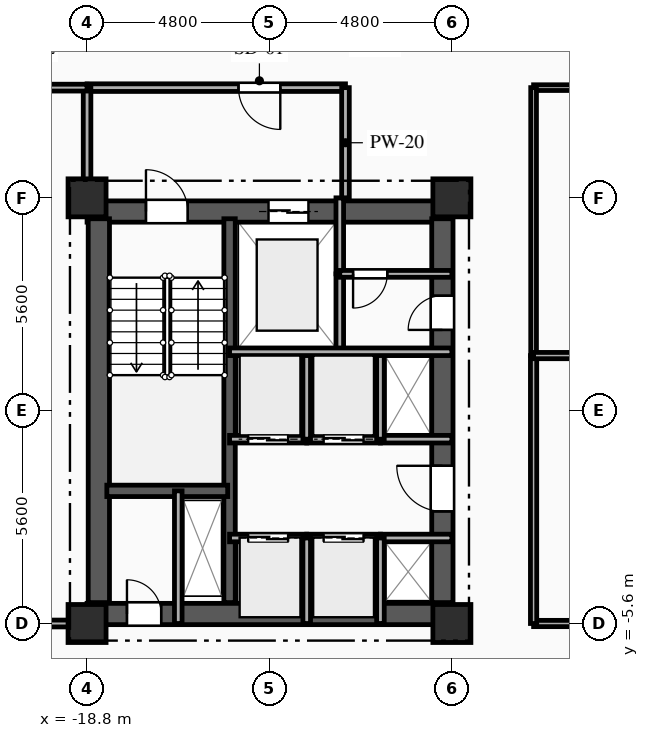
"""IFC4 building model, lengths in metres.
Left out: names, types, materials, properties, quantities, classifications, styles, units other than length and angle.
Written with IfcOpenShell. Run it as: python <this file> out.ifc"""

import sys

from ifc_helpers import new_model, si_unit, direction, frame, frame_2d, origin, origin_2d, place, context, subcontext, project, spatial, rectangle, extrude, element, fill, save


model = new_model("IFC4")
c1 = context("Model", 3, precision=1e-05, world=origin(), true_north=direction((0.0, 1.0)))
c2 = subcontext(c1, "Body", "Model", "MODEL_VIEW")
j1 = project(units=[si_unit("LENGTHUNIT", "METRE"), si_unit("PLANEANGLEUNIT", "RADIAN")], contexts=[c1])
p1 = place(None, origin())
s1 = spatial("IfcSite", under=j1, at=p1, CompositionType="ELEMENT")
p2 = place(p1, origin())
s2 = spatial("IfcBuilding", under=s1, at=p2, CompositionType="ELEMENT")
p3 = place(p2, frame((0.0, 0.0, 102.45)))
s3 = spatial("IfcBuildingStorey", under=s2, at=p3, CompositionType="ELEMENT", Elevation=102.45)
for number, where, z_axis, x_axis in (
    (1, (-18.8, -5.6, 0.0), (0.0, 0.0, 1.0), (1.0, 0.0, 0.0)),
    (2, (-18.8, 5.6, 0.0), (0.0, 0.0, 1.0), (1.0, 0.0, 0.0)),
    (3, (-9.2, -5.6, 0.0), (0.0, 0.0, 1.0), (1.0, 0.0, 0.0)),
    (4, (-9.2, 5.6, 0.0), (0.0, 0.0, 1.0), (1.0, 0.0, 0.0)),
):
    element("IfcColumn", number, at=place(p3, frame(where, z_axis=z_axis, x_axis=x_axis)), inside=s3, PredefinedType="COLUMN", context=c2, shape_type="SweptSolid", body=[
        extrude(rectangle(XDim=1.0, YDim=1.0, at=origin_2d()), origin(), (0.0, 0.0, 1.0), 3.35),
    ])
p4 = place(p3, frame((-18.8, 5.24, 0.0), z_axis=(0.0, 0.0, 1.0), x_axis=(1.0, 0.0, 0.0)))
e5 = element("IfcWall", 5, at=p4, inside=s3, PredefinedType="SHEAR", context=c2, shape_type="SweptSolid", body=[
    extrude(rectangle(XDim=9.6, YDim=0.56, at=frame_2d((4.8, 0.0))), origin(), (0.0, 0.0, 1.0), 3.045),
])
p5 = place(p4, frame((1.55, 0.0, 0.0)))
e6 = element("IfcOpeningElement", 6, at=p5, cuts=e5, PredefinedType="OPENING", context=c2, shape_type="SweptSolid", body=[
    extrude(rectangle(XDim=1.1, YDim=2.15, at=frame_2d((0.55, 1.075))), frame((0.0, 0.29, 0.0), z_axis=(0.0, -1.0, 0.0), x_axis=(1.0, 0.0, 0.0)), (0.0, 0.0, 1.0), 0.58),
])
p6 = place(p4, frame((4.775, 0.0, 0.0)))
e7 = element("IfcOpeningElement", 7, at=p6, cuts=e5, PredefinedType="OPENING", context=c2, shape_type="SweptSolid", body=[
    extrude(rectangle(XDim=1.05, YDim=2.1, at=frame_2d((0.525, 1.05))), frame((0.0, 0.29, 0.0), z_axis=(0.0, -1.0, 0.0), x_axis=(1.0, 0.0, 0.0)), (0.0, 0.0, 1.0), 0.58),
])
p7 = place(p3, frame((-18.8, -5.35, 0.0), z_axis=(0.0, 0.0, 1.0), x_axis=(1.0, 0.0, 0.0)))
e8 = element("IfcWall", 8, at=p7, inside=s3, PredefinedType="SHEAR", context=c2, shape_type="SweptSolid", body=[
    extrude(rectangle(XDim=9.6, YDim=0.56, at=frame_2d((4.8, 0.0))), origin(), (0.0, 0.0, 1.0), 3.045),
])
p8 = place(p7, frame((1.05, 0.0, 0.0)))
e9 = element("IfcOpeningElement", 9, at=p8, cuts=e8, PredefinedType="OPENING", context=c2, shape_type="SweptSolid", body=[
    extrude(rectangle(XDim=0.9, YDim=2.1, at=frame_2d((0.45, 1.05))), frame((0.0, 0.29, 0.0), z_axis=(0.0, -1.0, 0.0), x_axis=(1.0, 0.0, 0.0)), (0.0, 0.0, 1.0), 0.58),
])
p9 = place(p3, frame((-18.49, -5.05, 0.0), z_axis=(0.0, 0.0, 1.0), x_axis=(0.0, 1.0, 0.0)))
e10 = element("IfcWall", 10, at=p9, inside=s3, PredefinedType="SHEAR", context=c2, shape_type="SweptSolid", body=[
    extrude(rectangle(XDim=10.1, YDim=0.56, at=frame_2d((5.05, 0.0))), origin(), (0.0, 0.0, 1.0), 3.045),
])
p10 = place(p3, frame((-9.45, -5.05, 0.0), z_axis=(0.0, 0.0, 1.0), x_axis=(0.0, 1.0, 0.0)))
e11 = element("IfcWall", 11, at=p10, inside=s3, PredefinedType="SHEAR", context=c2, shape_type="SweptSolid", body=[
    extrude(rectangle(XDim=10.1, YDim=0.56, at=frame_2d((5.05, 0.0))), origin(), (0.0, 0.0, 1.0), 3.045),
])
p11 = place(p10, frame((7.175, 0.0, 0.0)))
e12 = element("IfcOpeningElement", 12, at=p11, cuts=e11, PredefinedType="OPENING", context=c2, shape_type="SweptSolid", body=[
    extrude(rectangle(XDim=0.9, YDim=2.1, at=frame_2d((0.45, 1.05))), frame((0.0, 0.29, 0.0), z_axis=(0.0, -1.0, 0.0), x_axis=(1.0, 0.0, 0.0)), (0.0, 0.0, 1.0), 0.58),
])
p12 = place(p10, frame((2.4, 0.0, 0.0)))
e13 = element("IfcOpeningElement", 13, at=p12, cuts=e11, PredefinedType="OPENING", context=c2, shape_type="SweptSolid", body=[
    extrude(rectangle(XDim=1.2, YDim=2.15, at=frame_2d((0.6, 1.075))), frame((0.0, 0.29, 0.0), z_axis=(0.0, -1.0, 0.0), x_axis=(1.0, 0.0, 0.0)), (0.0, 0.0, 1.0), 0.58),
])
p13 = place(p3, frame((-15.05, -5.05, 0.0), z_axis=(0.0, 0.0, 1.0), x_axis=(0.0, 1.0, 0.0)))
e14 = element("IfcWall", 14, at=p13, inside=s3, PredefinedType="SHEAR", context=c2, shape_type="SweptSolid", body=[
    extrude(rectangle(XDim=10.1, YDim=0.3, at=frame_2d((5.05, 0.0))), origin(), (0.0, 0.0, 1.0), 3.045),
])
p14 = place(p3, frame((-18.28, -2.11, 0.0), z_axis=(0.0, 0.0, 1.0), x_axis=(1.0, 0.0, 0.0)))
e15 = element("IfcWall", 15, at=p14, inside=s3, PredefinedType="SHEAR", context=c2, shape_type="SweptSolid", body=[
    extrude(rectangle(XDim=3.18, YDim=0.3, at=frame_2d((1.59, 0.0))), origin(), (0.0, 0.0, 1.0), 3.045),
])
p15 = place(p3, frame((-16.4, -5.6, 0.0), z_axis=(0.0, 0.0, 1.0), x_axis=(0.0, 1.0, 0.0)))
e16 = element("IfcWall", 16, at=p15, inside=s3, PredefinedType="PARTITIONING", context=c2, shape_type="SweptSolid", body=[
    extrude(rectangle(XDim=3.49, YDim=0.2, at=frame_2d((1.745, 0.0))), origin(), (0.0, 0.0, 1.0), 3.045),
])
p16 = place(p3, frame((-12.15, 1.55, 0.0), z_axis=(0.0, 0.0, 1.0), x_axis=(0.0, 1.0, 0.0)))
e17 = element("IfcWall", 17, at=p16, inside=s3, PredefinedType="PARTITIONING", context=c2, shape_type="SweptSolid", body=[
    extrude(rectangle(XDim=2.05, YDim=0.2, at=frame_2d((1.025, 0.0))), origin(), (0.0, 0.0, 1.0), 3.045),
])
p17 = place(p3, frame((-12.15, 3.6, 0.0), z_axis=(0.0, 0.0, 1.0), x_axis=(0.0, 1.0, 0.0)))
e18 = element("IfcWall", 18, at=p17, inside=s3, PredefinedType="PARTITIONING", context=c2, shape_type="SweptSolid", body=[
    extrude(rectangle(XDim=2.0, YDim=0.2, at=frame_2d((1.0, 0.0))), origin(), (0.0, 0.0, 1.0), 3.045),
])
p18 = place(p3, frame((-12.0, 8.5, 0.0), z_axis=(0.0, 0.0, 1.0), x_axis=(-1.0, 0.0, 0.0)))
e19 = element("IfcWall", 19, at=p18, inside=s3, PredefinedType="PARTITIONING", context=c2, shape_type="SweptSolid", body=[
    extrude(rectangle(XDim=6.8, YDim=0.2, at=frame_2d((3.4, 0.0))), origin(), (0.0, 0.0, 1.0), 3.045),
])
p19 = place(p18, frame((1.715, 0.0, 0.0)))
e20 = element("IfcOpeningElement", 20, at=p19, cuts=e19, PredefinedType="OPENING", context=c2, shape_type="SweptSolid", body=[
    extrude(rectangle(XDim=1.1, YDim=2.15, at=frame_2d((0.55, 1.075))), frame((0.0, 0.11, 0.0), z_axis=(0.0, -1.0, 0.0), x_axis=(1.0, 0.0, 0.0)), (0.0, 0.0, 1.0), 0.22),
])
p20 = place(p3, frame((-12.0, 5.6, 0.0), z_axis=(0.0, 0.0, 1.0), x_axis=(0.0, 1.0, 0.0)))
e21 = element("IfcWall", 21, at=p20, inside=s3, PredefinedType="PARTITIONING", context=c2, shape_type="SweptSolid", body=[
    extrude(rectangle(XDim=2.9, YDim=0.2, at=frame_2d((1.45, 0.0))), origin(), (0.0, 0.0, 1.0), 3.045),
])
p21 = place(p3, frame((-18.8, 8.5, 0.0), z_axis=(0.0, 0.0, 1.0), x_axis=(0.0, -1.0, 0.0)))
e22 = element("IfcWall", 22, at=p21, inside=s3, PredefinedType="PARTITIONING", context=c2, shape_type="SweptSolid", body=[
    extrude(rectangle(XDim=2.9, YDim=0.2, at=frame_2d((1.45, 0.0))), origin(), (0.0, 0.0, 1.0), 2.53),
])
p22 = place(p3, frame((-9.2, 3.6, 0.0), z_axis=(0.0, 0.0, 1.0), x_axis=(-1.0, 0.0, 0.0)))
e23 = element("IfcWall", 23, at=p22, inside=s3, PredefinedType="PARTITIONING", context=c2, shape_type="SweptSolid", body=[
    extrude(rectangle(XDim=2.95, YDim=0.18, at=frame_2d((1.475, 0.0))), origin(), (0.0, 0.0, 1.0), 3.045),
])
p23 = place(p22, frame((1.7, 0.0, 0.0)))
e24 = element("IfcOpeningElement", 24, at=p23, cuts=e23, PredefinedType="OPENING", context=c2, shape_type="SweptSolid", body=[
    extrude(rectangle(XDim=0.9, YDim=2.1, at=frame_2d((0.45, 1.05))), frame((0.0, 0.1, 0.0), z_axis=(0.0, -1.0, 0.0), x_axis=(1.0, 0.0, 0.0)), (0.0, 0.0, 1.0), 0.2),
])
p24 = place(p3, frame((-15.05, -3.35, 0.0), z_axis=(0.0, 0.0, 1.0), x_axis=(1.0, 0.0, 0.0)))
e25 = element("IfcWall", 25, at=p24, inside=s3, PredefinedType="PARTITIONING", context=c2, shape_type="SweptSolid", body=[
    extrude(rectangle(XDim=2.03, YDim=0.2, at=frame_2d((1.015, 0.0))), origin(), (0.0, 0.0, 1.0), 3.045),
])
p25 = place(p24, frame((0.49, 0.0, 0.0)))
e26 = element("IfcOpeningElement", 26, at=p25, cuts=e25, PredefinedType="OPENING", context=c2, shape_type="SweptSolid", body=[
    extrude(rectangle(XDim=1.05, YDim=2.1, at=frame_2d((0.525, 1.05))), frame((0.0, 0.11, 0.0), z_axis=(0.0, -1.0, 0.0), x_axis=(1.0, 0.0, 0.0)), (0.0, 0.0, 1.0), 0.22),
])
p26 = place(p3, frame((-13.02, -3.35, 0.0), z_axis=(0.0, 0.0, 1.0), x_axis=(1.0, 0.0, 0.0)))
e27 = element("IfcWall", 27, at=p26, inside=s3, PredefinedType="PARTITIONING", context=c2, shape_type="SweptSolid", body=[
    extrude(rectangle(XDim=1.94, YDim=0.2, at=frame_2d((0.97, 0.0))), origin(), (0.0, 0.0, 1.0), 3.045),
])
p27 = place(p26, frame((0.445, 0.0, 0.0)))
e28 = element("IfcOpeningElement", 28, at=p27, cuts=e27, PredefinedType="OPENING", context=c2, shape_type="SweptSolid", body=[
    extrude(rectangle(XDim=1.05, YDim=2.1, at=frame_2d((0.525, 1.05))), frame((0.0, 0.11, 0.0), z_axis=(0.0, -1.0, 0.0), x_axis=(1.0, 0.0, 0.0)), (0.0, 0.0, 1.0), 0.22),
])
p28 = place(p3, frame((-11.08, -3.35, 0.0), z_axis=(0.0, 0.0, 1.0), x_axis=(1.0, 0.0, 0.0)))
e29 = element("IfcWall", 29, at=p28, inside=s3, PredefinedType="PARTITIONING", context=c2, shape_type="SweptSolid", body=[
    extrude(rectangle(XDim=1.88, YDim=0.2, at=frame_2d((0.94, 0.0))), origin(), (0.0, 0.0, 1.0), 2.76),
])
p29 = place(p3, frame((-13.02, -0.75, 0.0), z_axis=(0.0, 0.0, 1.0), x_axis=(-1.0, 0.0, 0.0)))
e30 = element("IfcWall", 30, at=p29, inside=s3, PredefinedType="PARTITIONING", context=c2, shape_type="SweptSolid", body=[
    extrude(rectangle(XDim=2.03, YDim=0.2, at=frame_2d((1.015, 0.0))), origin(), (0.0, 0.0, 1.0), 3.045),
])
p30 = place(p29, frame((0.49, 0.0, 0.0)))
e31 = element("IfcOpeningElement", 31, at=p30, cuts=e30, PredefinedType="OPENING", context=c2, shape_type="SweptSolid", body=[
    extrude(rectangle(XDim=1.05, YDim=2.1, at=frame_2d((0.525, 1.05))), frame((0.0, 0.11, 0.0), z_axis=(0.0, -1.0, 0.0), x_axis=(1.0, 0.0, 0.0)), (0.0, 0.0, 1.0), 0.22),
])
p31 = place(p3, frame((-11.08, -0.75, 0.0), z_axis=(0.0, 0.0, 1.0), x_axis=(-1.0, 0.0, 0.0)))
e32 = element("IfcWall", 32, at=p31, inside=s3, PredefinedType="PARTITIONING", context=c2, shape_type="SweptSolid", body=[
    extrude(rectangle(XDim=1.94, YDim=0.2, at=frame_2d((0.97, 0.0))), origin(), (0.0, 0.0, 1.0), 3.045),
])
p32 = place(p31, frame((0.445, 0.0, 0.0)))
e33 = element("IfcOpeningElement", 33, at=p32, cuts=e32, PredefinedType="OPENING", context=c2, shape_type="SweptSolid", body=[
    extrude(rectangle(XDim=1.05, YDim=2.1, at=frame_2d((0.525, 1.05))), frame((0.0, 0.11, 0.0), z_axis=(0.0, -1.0, 0.0), x_axis=(1.0, 0.0, 0.0)), (0.0, 0.0, 1.0), 0.22),
])
p33 = place(p3, frame((-9.2, -0.75, 0.0), z_axis=(0.0, 0.0, 1.0), x_axis=(-1.0, 0.0, 0.0)))
e34 = element("IfcWall", 34, at=p33, inside=s3, PredefinedType="PARTITIONING", context=c2, shape_type="SweptSolid", body=[
    extrude(rectangle(XDim=1.88, YDim=0.2, at=frame_2d((0.94, 0.0))), origin(), (0.0, 0.0, 1.0), 3.045),
])
for number, where, z_axis, x_axis in (
    (35, (-13.02, -5.6, 0.0), (0.0, 0.0, 1.0), (0.0, 1.0, 0.0)),
    (36, (-11.08, -5.6, 0.0), (0.0, 0.0, 1.0), (0.0, 1.0, 0.0)),
):
    element("IfcWall", number, at=place(p3, frame(where, z_axis=z_axis, x_axis=x_axis)), inside=s3, PredefinedType="PARTITIONING", context=c2, shape_type="SweptSolid", body=[
        extrude(rectangle(XDim=2.25, YDim=0.2, at=frame_2d((1.125, 0.0))), origin(), (0.0, 0.0, 1.0), 3.045),
    ])
for number, where, z_axis, x_axis in (
    (37, (-13.02, -0.75, 0.0), (0.0, 0.0, 1.0), (0.0, 1.0, 0.0)),
    (38, (-11.08, -0.75, 0.0), (0.0, 0.0, 1.0), (0.0, 1.0, 0.0)),
):
    element("IfcWall", number, at=place(p3, frame(where, z_axis=z_axis, x_axis=x_axis)), inside=s3, PredefinedType="PARTITIONING", context=c2, shape_type="SweptSolid", body=[
        extrude(rectangle(XDim=2.3, YDim=0.2, at=frame_2d((1.15, 0.0))), origin(), (0.0, 0.0, 1.0), 3.045),
    ])
p34 = place(p3, frame((-18.8, 8.5, 0.0), z_axis=(0.0, 0.0, 1.0), x_axis=(-1.0, 0.0, 0.0)))
e39 = element("IfcWall", 39, at=p34, inside=s3, PredefinedType="PARTITIONING", context=c2, shape_type="SweptSolid", body=[
    extrude(rectangle(XDim=2.65, YDim=0.18, at=frame_2d((1.325, 0.0))), origin(), (0.0, 0.0, 1.0), 3.045),
])
p35 = place(p34, frame((1.009, 0.0, 0.0)))
e40 = element("IfcOpeningElement", 40, at=p35, cuts=e39, PredefinedType="OPENING", context=c2, shape_type="SweptSolid", body=[
    extrude(rectangle(XDim=1.0, YDim=2.15, at=frame_2d((0.5, 1.075))), frame((0.0, 0.1, 0.0), z_axis=(0.0, -1.0, 0.0), x_axis=(1.0, 0.0, 0.0)), (0.0, 0.0, 1.0), 0.2),
])
p36 = place(p3, frame((0.0, 8.5, 0.0), z_axis=(0.0, 0.0, 1.0), x_axis=(-1.0, 0.0, 0.0)))
e41 = element("IfcWall", 41, at=p36, inside=s3, PredefinedType="PARTITIONING", context=c2, shape_type="SweptSolid", body=[
    extrude(rectangle(XDim=7.05, YDim=0.15, at=frame_2d((3.525, 0.0))), origin(), (0.0, 0.0, 1.0), 3.045),
])
p37 = place(p36, frame((1.185, 0.0, 0.0)))
e42 = element("IfcOpeningElement", 42, at=p37, cuts=e41, PredefinedType="OPENING", context=c2, shape_type="SweptSolid", body=[
    extrude(rectangle(XDim=1.05, YDim=2.15, at=frame_2d((0.525, 1.075))), frame((0.0, 0.085, 0.0), z_axis=(0.0, -1.0, 0.0), x_axis=(1.0, 0.0, 0.0)), (0.0, 0.0, 1.0), 0.17),
])
p38 = place(p3, frame((-21.45, -5.6, 0.0), z_axis=(0.0, 0.0, 1.0), x_axis=(1.0, 0.0, 0.0)))
e43 = element("IfcWall", 43, at=p38, inside=s3, PredefinedType="PARTITIONING", context=c2, shape_type="SweptSolid", body=[
    extrude(rectangle(XDim=2.65, YDim=0.18, at=frame_2d((1.325, 0.0))), origin(), (0.0, 0.0, 1.0), 3.045),
])
p39 = place(p3, frame((-7.05, -5.6, 0.0), z_axis=(0.0, 0.0, 1.0), x_axis=(1.0, 0.0, 0.0)))
e44 = element("IfcWall", 44, at=p39, inside=s3, PredefinedType="PARTITIONING", context=c2, shape_type="SweptSolid", body=[
    extrude(rectangle(XDim=7.05, YDim=0.165, at=frame_2d((3.525, 0.0))), origin(), (0.0, 0.0, 1.0), 2.53),
])
p40 = place(p39, frame((4.728, 0.0, 0.0)))
e45 = element("IfcOpeningElement", 45, at=p40, cuts=e44, PredefinedType="OPENING", context=c2, shape_type="SweptSolid", body=[
    extrude(rectangle(XDim=1.15, YDim=2.15, at=frame_2d((0.575, 1.075))), frame((0.0, 0.093, 0.0), z_axis=(0.0, -1.0, 0.0), x_axis=(1.0, 0.0, 0.0)), (0.0, 0.0, 1.0), 0.185),
])
p41 = place(p3, frame((-7.05, 1.45, 0.0), z_axis=(0.0, 0.0, 1.0), x_axis=(0.0, -1.0, 0.0)))
e46 = element("IfcWall", 46, at=p41, inside=s3, PredefinedType="PARTITIONING", context=c2, shape_type="SweptSolid", body=[
    extrude(rectangle(XDim=7.05, YDim=0.165, at=frame_2d((3.525, 0.0))), origin(), (0.0, 0.0, 1.0), 3.045),
])
p42 = place(p3, frame((-7.05, 8.5, 0.0), z_axis=(0.0, 0.0, 1.0), x_axis=(0.0, -1.0, 0.0)))
e47 = element("IfcWall", 47, at=p42, inside=s3, PredefinedType="PARTITIONING", context=c2, shape_type="SweptSolid", body=[
    extrude(rectangle(XDim=7.05, YDim=0.15, at=frame_2d((3.525, 0.0))), origin(), (0.0, 0.0, 1.0), 3.045),
])
p43 = place(p3, frame((-7.05, 1.45, 0.0), z_axis=(0.0, 0.0, 1.0), x_axis=(1.0, 0.0, 0.0)))
e48 = element("IfcWall", 48, at=p43, inside=s3, PredefinedType="PARTITIONING", context=c2, shape_type="SweptSolid", body=[
    extrude(rectangle(XDim=14.1, YDim=0.165, at=frame_2d((7.05, 0.0))), origin(), (0.0, 0.0, 1.0), 3.045),
])
p44 = place(p3, frame((-15.05, 1.55, 0.0), z_axis=(0.0, 0.0, 1.0), x_axis=(1.0, 0.0, 0.0)))
e49 = element("IfcWall", 49, at=p44, inside=s3, PredefinedType="PARTITIONING", context=c2, shape_type="SweptSolid", body=[
    extrude(rectangle(XDim=5.85, YDim=0.2, at=frame_2d((2.925, 0.0))), origin(), (0.0, 0.0, 1.0), 3.045),
])
p45 = place(p5, origin())
e50 = element("IfcDoor", 50, at=p45, inside=s3, OperationType="SINGLE_SWING_LEFT", PredefinedType="DOOR", context=c2, shape_type="SweptSolid", body=[
    extrude(rectangle(XDim=1.1, YDim=2.15, at=frame_2d((0.55, 1.075))), frame((0.0, 0.025, 0.0), z_axis=(0.0, -1.0, 0.0), x_axis=(1.0, 0.0, 0.0)), (0.0, 0.0, 1.0), 0.05),
])
fill(e6, e50)
p46 = place(p6, origin())
e51 = element("IfcDoor", 51, at=p46, inside=s3, OperationType="DOUBLE_DOOR_SLIDING", PredefinedType="DOOR", context=c2, shape_type="SweptSolid", body=[
    extrude(rectangle(XDim=1.05, YDim=2.1, at=frame_2d((0.525, 1.05))), frame((0.0, 0.025, 0.0), z_axis=(0.0, -1.0, 0.0), x_axis=(1.0, 0.0, 0.0)), (0.0, 0.0, 1.0), 0.05),
])
fill(e7, e51)
p47 = place(p8, origin())
e52 = element("IfcDoor", 52, at=p47, inside=s3, OperationType="SINGLE_SWING_LEFT", PredefinedType="DOOR", context=c2, shape_type="SweptSolid", body=[
    extrude(rectangle(XDim=0.9, YDim=2.1, at=frame_2d((0.45, 1.05))), frame((0.0, 0.025, 0.0), z_axis=(0.0, -1.0, 0.0), x_axis=(1.0, 0.0, 0.0)), (0.0, 0.0, 1.0), 0.05),
])
fill(e9, e52)
p48 = place(p19, origin())
e53 = element("IfcDoor", 53, at=p48, inside=s3, OperationType="SINGLE_SWING_LEFT", PredefinedType="DOOR", context=c2, shape_type="SweptSolid", body=[
    extrude(rectangle(XDim=1.1, YDim=2.15, at=frame_2d((0.55, 1.075))), frame((0.0, 0.025, 0.0), z_axis=(0.0, -1.0, 0.0), x_axis=(1.0, 0.0, 0.0)), (0.0, 0.0, 1.0), 0.05),
])
fill(e20, e53)
p49 = place(p23, origin())
e54 = element("IfcDoor", 54, at=p49, inside=s3, OperationType="SINGLE_SWING_RIGHT", PredefinedType="DOOR", context=c2, shape_type="SweptSolid", body=[
    extrude(rectangle(XDim=0.9, YDim=2.1, at=frame_2d((0.45, 1.05))), frame((0.0, 0.025, 0.0), z_axis=(0.0, -1.0, 0.0), x_axis=(1.0, 0.0, 0.0)), (0.0, 0.0, 1.0), 0.05),
])
fill(e24, e54)
p50 = place(p11, origin())
e55 = element("IfcDoor", 55, at=p50, inside=s3, OperationType="SINGLE_SWING_LEFT", PredefinedType="DOOR", context=c2, shape_type="SweptSolid", body=[
    extrude(rectangle(XDim=0.9, YDim=2.1, at=frame_2d((0.45, 1.05))), frame((0.0, 0.025, 0.0), z_axis=(0.0, -1.0, 0.0), x_axis=(1.0, 0.0, 0.0)), (0.0, 0.0, 1.0), 0.05),
])
fill(e12, e55)
p51 = place(p25, origin())
e56 = element("IfcDoor", 56, at=p51, inside=s3, OperationType="DOUBLE_DOOR_SLIDING", PredefinedType="DOOR", context=c2, shape_type="SweptSolid", body=[
    extrude(rectangle(XDim=1.05, YDim=2.1, at=frame_2d((0.525, 1.05))), frame((0.0, 0.025, 0.0), z_axis=(0.0, -1.0, 0.0), x_axis=(1.0, 0.0, 0.0)), (0.0, 0.0, 1.0), 0.05),
])
fill(e26, e56)
p52 = place(p27, origin())
e57 = element("IfcDoor", 57, at=p52, inside=s3, OperationType="DOUBLE_DOOR_SLIDING", PredefinedType="DOOR", context=c2, shape_type="SweptSolid", body=[
    extrude(rectangle(XDim=1.05, YDim=2.1, at=frame_2d((0.525, 1.05))), frame((0.0, 0.025, 0.0), z_axis=(0.0, -1.0, 0.0), x_axis=(1.0, 0.0, 0.0)), (0.0, 0.0, 1.0), 0.05),
])
fill(e28, e57)
p53 = place(p30, origin())
e58 = element("IfcDoor", 58, at=p53, inside=s3, OperationType="DOUBLE_DOOR_SLIDING", PredefinedType="DOOR", context=c2, shape_type="SweptSolid", body=[
    extrude(rectangle(XDim=1.05, YDim=2.1, at=frame_2d((0.525, 1.05))), frame((0.0, 0.025, 0.0), z_axis=(0.0, -1.0, 0.0), x_axis=(1.0, 0.0, 0.0)), (0.0, 0.0, 1.0), 0.05),
])
fill(e31, e58)
p54 = place(p32, origin())
e59 = element("IfcDoor", 59, at=p54, inside=s3, OperationType="DOUBLE_DOOR_SLIDING", PredefinedType="DOOR", context=c2, shape_type="SweptSolid", body=[
    extrude(rectangle(XDim=1.05, YDim=2.1, at=frame_2d((0.525, 1.05))), frame((0.0, 0.025, 0.0), z_axis=(0.0, -1.0, 0.0), x_axis=(1.0, 0.0, 0.0)), (0.0, 0.0, 1.0), 0.05),
])
fill(e33, e59)
p55 = place(p12, origin())
e60 = element("IfcDoor", 60, at=p55, inside=s3, OperationType="SINGLE_SWING_RIGHT", PredefinedType="DOOR", context=c2, shape_type="SweptSolid", body=[
    extrude(rectangle(XDim=1.2, YDim=2.15, at=frame_2d((0.6, 1.075))), frame((0.0, 0.025, 0.0), z_axis=(0.0, -1.0, 0.0), x_axis=(1.0, 0.0, 0.0)), (0.0, 0.0, 1.0), 0.05),
])
fill(e13, e60)
save(model, sys.argv[1])
